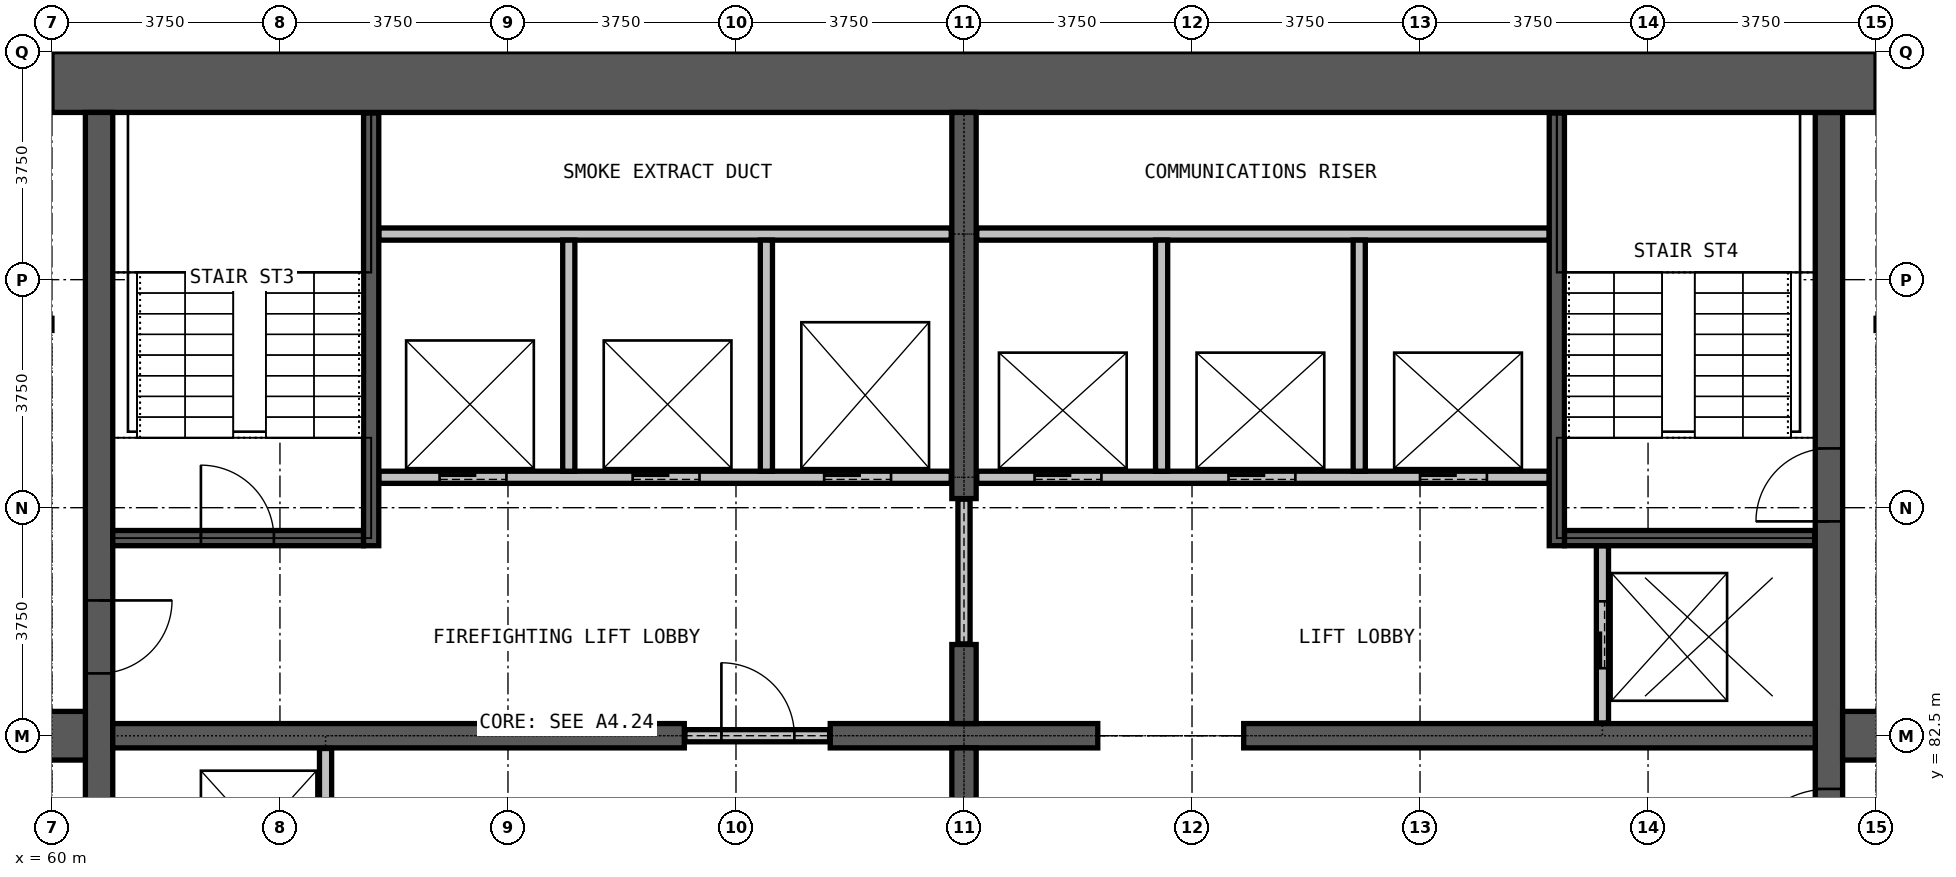
"""IFC4 building model, lengths in metres.
Left out: names, types, materials, properties, quantities, classifications, styles, units other than length and angle.
Written with IfcOpenShell. Run it as: python <this file> out.ifc"""

import sys

from ifc_helpers import new_model, si_unit, direction, frame, frame_2d, origin, place, context, subcontext, project, spatial, rectangle, extrude, element, fill, save


model = new_model("IFC4")
c1 = context("Model", 3, precision=1e-05, world=origin(), true_north=direction((0.0, 1.0)))
c2 = subcontext(c1, "Body", "Model", "MODEL_VIEW")
j1 = project(units=[si_unit("LENGTHUNIT", "METRE"), si_unit("PLANEANGLEUNIT", "RADIAN")], contexts=[c1])
p1 = place(None, origin())
s1 = spatial("IfcSite", under=j1, at=p1, CompositionType="ELEMENT")
p2 = place(p1, origin())
s2 = spatial("IfcBuilding", under=s1, at=p2, CompositionType="ELEMENT")
p3 = place(p2, frame((0.0, 0.0, 253.5)))
s3 = spatial("IfcBuildingStorey", under=s2, at=p3, CompositionType="ELEMENT", Elevation=253.5)
p4 = place(p3, frame((89.225, 72.25, 0.0), z_axis=(0.0, 0.0, 1.0), x_axis=(0.0, 1.0, 0.0)))
e1 = element("IfcWall", 1, at=p4, inside=s3, PredefinedType="SHEAR", context=c2, shape_type="SweptSolid", body=[
    extrude(rectangle(XDim=20.5, YDim=0.45, at=frame_2d((10.25, 0.0))), origin(), (0.0, 0.0, 1.0), 5.0),
])
p5 = place(p4, frame((0.275, 0.0, 0.0)))
e2 = element("IfcOpeningElement", 2, at=p5, cuts=e1, PredefinedType="OPENING", context=c2, shape_type="SweptSolid", body=[
    extrude(rectangle(XDim=1.2, YDim=2.2, at=frame_2d((0.6, 1.1))), frame((0.0, 0.235, 0.0), z_axis=(0.0, -1.0, 0.0), x_axis=(1.0, 0.0, 0.0)), (0.0, 0.0, 1.0), 0.47),
])
p6 = place(p4, frame((13.775, 0.0, 0.0)))
e3 = element("IfcOpeningElement", 3, at=p6, cuts=e1, PredefinedType="OPENING", context=c2, shape_type="SweptSolid", body=[
    extrude(rectangle(XDim=1.2, YDim=2.2, at=frame_2d((0.6, 1.1))), frame((0.0, 0.235, 0.0), z_axis=(0.0, -1.0, 0.0), x_axis=(1.0, 0.0, 0.0)), (0.0, 0.0, 1.0), 0.47),
])
p7 = place(p4, frame((7.875, 0.0, 0.0)))
e4 = element("IfcOpeningElement", 4, at=p7, cuts=e1, PredefinedType="OPENING", context=c2, shape_type="SweptSolid", body=[
    extrude(rectangle(XDim=1.5, YDim=2.2, at=frame_2d((0.75, 1.1))), frame((0.0, 0.235, 0.0), z_axis=(0.0, -1.0, 0.0), x_axis=(1.0, 0.0, 0.0)), (0.0, 0.0, 1.0), 0.47),
])
p8 = place(p3, frame((90.0, 93.25, 0.0), z_axis=(0.0, 0.0, 1.0), x_axis=(-1.0, 0.0, 0.0)))
e5 = element("IfcWall", 5, at=p8, inside=s3, PredefinedType="SHEAR", context=c2, shape_type="SweptSolid", body=[
    extrude(rectangle(XDim=30.0, YDim=1.0, at=frame_2d((15.0, 0.0))), origin(), (0.0, 0.0, 1.0), 5.0),
])
p9 = place(p3, frame((60.775, 92.75, 0.0), z_axis=(0.0, 0.0, 1.0), x_axis=(0.0, -1.0, 0.0)))
e6 = element("IfcWall", 6, at=p9, inside=s3, PredefinedType="SHEAR", context=c2, shape_type="SweptSolid", body=[
    extrude(rectangle(XDim=20.5, YDim=0.45, at=frame_2d((10.25, 0.0))), origin(), (0.0, 0.0, 1.0), 5.0),
])
p10 = place(p9, frame((19.025, 0.0, 0.0)))
e7 = element("IfcOpeningElement", 7, at=p10, cuts=e6, PredefinedType="OPENING", context=c2, shape_type="SweptSolid", body=[
    extrude(rectangle(XDim=1.2, YDim=2.2, at=frame_2d((0.6, 1.1))), frame((0.0, 0.235, 0.0), z_axis=(0.0, -1.0, 0.0), x_axis=(1.0, 0.0, 0.0)), (0.0, 0.0, 1.0), 0.47),
])
p11 = place(p9, frame((8.025, 0.0, 0.0)))
e8 = element("IfcOpeningElement", 8, at=p11, cuts=e6, PredefinedType="OPENING", context=c2, shape_type="SweptSolid", body=[
    extrude(rectangle(XDim=1.2, YDim=2.2, at=frame_2d((0.6, 1.1))), frame((0.0, 0.235, 0.0), z_axis=(0.0, -1.0, 0.0), x_axis=(1.0, 0.0, 0.0)), (0.0, 0.0, 1.0), 0.47),
])
p12 = place(p3, frame((61.0, 82.5, 0.0), z_axis=(0.0, 0.0, 1.0), x_axis=(1.0, 0.0, 0.0)))
e9 = element("IfcWall", 9, at=p12, inside=s3, PredefinedType="SHEAR", context=c2, shape_type="SweptSolid", body=[
    extrude(rectangle(XDim=9.4, YDim=0.4, at=frame_2d((4.7, 0.0))), origin(), (0.0, 0.0, 1.0), 5.0),
])
p13 = place(p3, frame((72.8, 82.5, 0.0), z_axis=(0.0, 0.0, 1.0), x_axis=(1.0, 0.0, 0.0)))
e10 = element("IfcWall", 10, at=p13, inside=s3, PredefinedType="SHEAR", context=c2, shape_type="SweptSolid", body=[
    extrude(rectangle(XDim=4.4, YDim=0.4, at=frame_2d((2.2, 0.0))), origin(), (0.0, 0.0, 1.0), 5.0),
])
p14 = place(p3, frame((79.6, 82.5, 0.0), z_axis=(0.0, 0.0, 1.0), x_axis=(1.0, 0.0, 0.0)))
e11 = element("IfcWall", 11, at=p14, inside=s3, PredefinedType="SHEAR", context=c2, shape_type="SweptSolid", body=[
    extrude(rectangle(XDim=9.4, YDim=0.4, at=frame_2d((4.7, 0.0))), origin(), (0.0, 0.0, 1.0), 5.0),
])
for number, where, z_axis, x_axis in (
    (12, (75.0, 81.0, 0.0), (0.0, 0.0, 1.0), (0.0, 1.0, 0.0)),
    (13, (75.0, 82.7, 0.0), (0.0, 0.0, 1.0), (0.0, 1.0, 0.0)),
):
    element("IfcWall", number, at=place(p3, frame(where, z_axis=z_axis, x_axis=x_axis)), inside=s3, PredefinedType="SHEAR", context=c2, shape_type="SweptSolid", body=[
        extrude(rectangle(XDim=1.3, YDim=0.4, at=frame_2d((0.65, 0.0))), origin(), (0.0, 0.0, 1.0), 5.0),
    ])
p15 = place(p3, frame((75.0, 86.4, 0.0), z_axis=(0.0, 0.0, 1.0), x_axis=(0.0, 1.0, 0.0)))
e14 = element("IfcWall", 14, at=p15, inside=s3, PredefinedType="SHEAR", context=c2, shape_type="SweptSolid", body=[
    extrude(rectangle(XDim=6.35, YDim=0.4, at=frame_2d((3.175, 0.0))), origin(), (0.0, 0.0, 1.0), 5.0),
])
for number, where, z_axis, x_axis in (
    (15, (89.45, 82.5, 0.0), (0.0, 0.0, 1.0), (1.0, 0.0, 0.0)),
    (16, (57.95, 82.5, 0.0), (0.0, 0.0, 1.0), (1.0, 0.0, 0.0)),
):
    element("IfcWall", number, at=place(p3, frame(where, z_axis=z_axis, x_axis=x_axis)), inside=s3, PredefinedType="SHEAR", context=c2, shape_type="SweptSolid", body=[
        extrude(rectangle(XDim=2.6, YDim=0.8, at=frame_2d((1.3, 0.0))), origin(), (0.0, 0.0, 1.0), 4.7),
    ])
p16 = place(p3, frame((70.41, 82.5, 0.0), z_axis=(0.0, 0.0, 1.0), x_axis=(1.0, 0.0, 0.0)))
e17 = element("IfcWall", 17, at=p16, inside=s3, PredefinedType="PARTITIONING", context=c2, shape_type="SweptSolid", body=[
    extrude(rectangle(XDim=2.38, YDim=0.2, at=frame_2d((1.19, 0.0))), origin(), (0.0, 0.0, 1.0), 2.4),
])
p17 = place(p16, frame((0.6, 0.0, 0.0)))
e18 = element("IfcOpeningElement", 18, at=p17, cuts=e17, PredefinedType="OPENING", context=c2, shape_type="SweptSolid", body=[
    extrude(rectangle(XDim=1.2, YDim=2.2, at=frame_2d((0.6, 1.1))), frame((0.0, 0.11, 0.0), z_axis=(0.0, -1.0, 0.0), x_axis=(1.0, 0.0, 0.0)), (0.0, 0.0, 1.0), 0.22),
])
p18 = place(p3, frame((75.0, 84.01, 0.0), z_axis=(0.0, 0.0, 1.0), x_axis=(0.0, 1.0, 0.0)))
e19 = element("IfcWall", 19, at=p18, inside=s3, PredefinedType="PARTITIONING", context=c2, shape_type="SweptSolid", body=[
    extrude(rectangle(XDim=2.38, YDim=0.2, at=frame_2d((1.19, 0.0))), origin(), (0.0, 0.0, 1.0), 2.4),
])
p19 = place(p3, frame((65.375, 86.75, 0.0), z_axis=(0.0, 0.0, 1.0), x_axis=(1.0, 0.0, 0.0)))
e20 = element("IfcWall", 20, at=p19, inside=s3, PredefinedType="PARTITIONING", context=c2, shape_type="SweptSolid", body=[
    extrude(rectangle(XDim=9.415, YDim=0.2, at=frame_2d((4.708, 0.0))), origin(), (0.0, 0.0, 1.0), 4.7),
])
p20 = place(p19, frame((1.0, 0.0, 0.0)))
e21 = element("IfcOpeningElement", 21, at=p20, cuts=e20, PredefinedType="OPENING", context=c2, shape_type="SweptSolid", body=[
    extrude(rectangle(XDim=1.1, YDim=2.2, at=frame_2d((0.55, 1.1))), frame((0.0, 0.11, 0.0), z_axis=(0.0, -1.0, 0.0), x_axis=(1.0, 0.0, 0.0)), (0.0, 0.0, 1.0), 0.22),
])
p21 = place(p19, frame((4.175, 0.0, 0.0)))
e22 = element("IfcOpeningElement", 22, at=p21, cuts=e20, PredefinedType="OPENING", context=c2, shape_type="SweptSolid", body=[
    extrude(rectangle(XDim=1.1, YDim=2.2, at=frame_2d((0.55, 1.1))), frame((0.0, 0.11, 0.0), z_axis=(0.0, -1.0, 0.0), x_axis=(1.0, 0.0, 0.0)), (0.0, 0.0, 1.0), 0.22),
])
p22 = place(p19, frame((7.325, 0.0, 0.0)))
e23 = element("IfcOpeningElement", 23, at=p22, cuts=e20, PredefinedType="OPENING", context=c2, shape_type="SweptSolid", body=[
    extrude(rectangle(XDim=1.1, YDim=2.2, at=frame_2d((0.55, 1.1))), frame((0.0, 0.11, 0.0), z_axis=(0.0, -1.0, 0.0), x_axis=(1.0, 0.0, 0.0)), (0.0, 0.0, 1.0), 0.22),
])
p23 = place(p3, frame((75.21, 86.75, 0.0), z_axis=(0.0, 0.0, 1.0), x_axis=(1.0, 0.0, 0.0)))
e24 = element("IfcWall", 24, at=p23, inside=s3, PredefinedType="PARTITIONING", context=c2, shape_type="SweptSolid", body=[
    extrude(rectangle(XDim=9.415, YDim=0.2, at=frame_2d((4.708, 0.0))), origin(), (0.0, 0.0, 1.0), 4.7),
])
p24 = place(p23, frame((0.95, 0.0, 0.0)))
e25 = element("IfcOpeningElement", 25, at=p24, cuts=e24, PredefinedType="OPENING", context=c2, shape_type="SweptSolid", body=[
    extrude(rectangle(XDim=1.1, YDim=2.2, at=frame_2d((0.55, 1.1))), frame((0.0, 0.11, 0.0), z_axis=(0.0, -1.0, 0.0), x_axis=(1.0, 0.0, 0.0)), (0.0, 0.0, 1.0), 0.22),
])
p25 = place(p23, frame((4.14, 0.0, 0.0)))
e26 = element("IfcOpeningElement", 26, at=p25, cuts=e24, PredefinedType="OPENING", context=c2, shape_type="SweptSolid", body=[
    extrude(rectangle(XDim=1.1, YDim=2.2, at=frame_2d((0.55, 1.1))), frame((0.0, 0.11, 0.0), z_axis=(0.0, -1.0, 0.0), x_axis=(1.0, 0.0, 0.0)), (0.0, 0.0, 1.0), 0.22),
])
p26 = place(p23, frame((7.29, 0.0, 0.0)))
e27 = element("IfcOpeningElement", 27, at=p26, cuts=e24, PredefinedType="OPENING", context=c2, shape_type="SweptSolid", body=[
    extrude(rectangle(XDim=1.1, YDim=2.2, at=frame_2d((0.55, 1.1))), frame((0.0, 0.11, 0.0), z_axis=(0.0, -1.0, 0.0), x_axis=(1.0, 0.0, 0.0)), (0.0, 0.0, 1.0), 0.22),
])
for number, where, z_axis, x_axis in (
    (28, (65.375, 90.75, 0.0), (0.0, 0.0, 1.0), (1.0, 0.0, 0.0)),
    (29, (75.21, 90.75, 0.0), (0.0, 0.0, 1.0), (1.0, 0.0, 0.0)),
):
    element("IfcWall", number, at=place(p3, frame(where, z_axis=z_axis, x_axis=x_axis)), inside=s3, PredefinedType="PARTITIONING", context=c2, shape_type="SweptSolid", body=[
        extrude(rectangle(XDim=9.415, YDim=0.2, at=frame_2d((4.708, 0.0))), origin(), (0.0, 0.0, 1.0), 4.7),
    ])
p27 = place(p3, frame((64.5, 79.375, 0.0), z_axis=(0.0, 0.0, 1.0), x_axis=(0.0, 1.0, 0.0)))
e30 = element("IfcWall", 30, at=p27, inside=s3, PredefinedType="PARTITIONING", context=c2, shape_type="SweptSolid", body=[
    extrude(rectangle(XDim=2.915, YDim=0.2, at=frame_2d((1.458, 0.0))), origin(), (0.0, 0.0, 1.0), 4.7),
])
for number, where, z_axis, x_axis in (
    (31, (68.5, 86.85, 0.0), (0.0, 0.0, 1.0), (0.0, 1.0, 0.0)),
    (32, (71.75, 86.85, 0.0), (0.0, 0.0, 1.0), (0.0, 1.0, 0.0)),
    (33, (78.25, 86.85, 0.0), (0.0, 0.0, 1.0), (0.0, 1.0, 0.0)),
    (34, (81.5, 86.85, 0.0), (0.0, 0.0, 1.0), (0.0, 1.0, 0.0)),
):
    element("IfcWall", number, at=place(p3, frame(where, z_axis=z_axis, x_axis=x_axis)), inside=s3, PredefinedType="PARTITIONING", context=c2, shape_type="SweptSolid", body=[
        extrude(rectangle(XDim=3.8, YDim=0.2, at=frame_2d((1.9, 0.0))), origin(), (0.0, 0.0, 1.0), 4.7),
    ])
p28 = place(p3, frame((85.5, 82.71, 0.0), z_axis=(0.0, 0.0, 1.0), x_axis=(0.0, 1.0, 0.0)))
e35 = element("IfcWall", 35, at=p28, inside=s3, PredefinedType="PARTITIONING", context=c2, shape_type="SweptSolid", body=[
    extrude(rectangle(XDim=2.915, YDim=0.2, at=frame_2d((1.458, 0.0))), origin(), (0.0, 0.0, 1.0), 4.7),
])
p29 = place(p28, frame((0.9, 0.0, 0.0)))
e36 = element("IfcOpeningElement", 36, at=p29, cuts=e35, PredefinedType="OPENING", context=c2, shape_type="SweptSolid", body=[
    extrude(rectangle(XDim=1.1, YDim=2.2, at=frame_2d((0.55, 1.1))), frame((0.0, 0.11, 0.0), z_axis=(0.0, -1.0, 0.0), x_axis=(1.0, 0.0, 0.0)), (0.0, 0.0, 1.0), 0.22),
])
p30 = place(p3, frame((61.0, 85.75, 0.0), z_axis=(0.0, 0.0, 1.0), x_axis=(1.0, 0.0, 0.0)))
e37 = element("IfcWall", 37, at=p30, inside=s3, PredefinedType="PARTITIONING", context=c2, shape_type="SweptSolid", body=[
    extrude(rectangle(XDim=4.125, YDim=0.25, at=frame_2d((2.062, 0.0))), origin(), (0.0, 0.0, 1.0), 4.7),
])
p31 = place(p30, frame((1.45, 0.0, 0.0)))
e38 = element("IfcOpeningElement", 38, at=p31, cuts=e37, PredefinedType="OPENING", context=c2, shape_type="SweptSolid", body=[
    extrude(rectangle(XDim=1.2, YDim=2.2, at=frame_2d((0.6, 1.1))), frame((0.0, 0.135, 0.0), z_axis=(0.0, -1.0, 0.0), x_axis=(1.0, 0.0, 0.0)), (0.0, 0.0, 1.0), 0.27),
])
p32 = place(p3, frame((84.875, 85.75, 0.0), z_axis=(0.0, 0.0, 1.0), x_axis=(1.0, 0.0, 0.0)))
e39 = element("IfcWall", 39, at=p32, inside=s3, PredefinedType="PARTITIONING", context=c2, shape_type="SweptSolid", body=[
    extrude(rectangle(XDim=4.115, YDim=0.25, at=frame_2d((2.058, 0.0))), origin(), (0.0, 0.0, 1.0), 4.7),
])
for number, where, z_axis, x_axis in (
    (40, (65.25, 85.625, 0.0), (0.0, 0.0, 1.0), (0.0, 1.0, 0.0)),
    (41, (84.75, 85.625, 0.0), (0.0, 0.0, 1.0), (0.0, 1.0, 0.0)),
):
    element("IfcWall", number, at=place(p3, frame(where, z_axis=z_axis, x_axis=x_axis)), inside=s3, PredefinedType="PARTITIONING", context=c2, shape_type="SweptSolid", body=[
        extrude(rectangle(XDim=7.115, YDim=0.25, at=frame_2d((3.558, 0.0))), origin(), (0.0, 0.0, 1.0), 4.7),
    ])
p33 = place(p24, origin())
e42 = element("IfcDoor", 42, at=p33, inside=s3, OperationType="DOUBLE_DOOR_SLIDING", PredefinedType="DOOR", context=c2, shape_type="SweptSolid", body=[
    extrude(rectangle(XDim=1.1, YDim=2.2, at=frame_2d((0.55, 1.1))), frame((0.0, 0.025, 0.0), z_axis=(0.0, -1.0, 0.0), x_axis=(1.0, 0.0, 0.0)), (0.0, 0.0, 1.0), 0.05),
])
fill(e25, e42)
p34 = place(p25, origin())
e43 = element("IfcDoor", 43, at=p34, inside=s3, OperationType="DOUBLE_DOOR_SLIDING", PredefinedType="DOOR", context=c2, shape_type="SweptSolid", body=[
    extrude(rectangle(XDim=1.1, YDim=2.2, at=frame_2d((0.55, 1.1))), frame((0.0, 0.025, 0.0), z_axis=(0.0, -1.0, 0.0), x_axis=(1.0, 0.0, 0.0)), (0.0, 0.0, 1.0), 0.05),
])
fill(e26, e43)
p35 = place(p26, origin())
e44 = element("IfcDoor", 44, at=p35, inside=s3, OperationType="DOUBLE_DOOR_SLIDING", PredefinedType="DOOR", context=c2, shape_type="SweptSolid", body=[
    extrude(rectangle(XDim=1.1, YDim=2.2, at=frame_2d((0.55, 1.1))), frame((0.0, 0.025, 0.0), z_axis=(0.0, -1.0, 0.0), x_axis=(1.0, 0.0, 0.0)), (0.0, 0.0, 1.0), 0.05),
])
fill(e27, e44)
p36 = place(p20, origin())
e45 = element("IfcDoor", 45, at=p36, inside=s3, OperationType="DOUBLE_DOOR_SLIDING", PredefinedType="DOOR", context=c2, shape_type="SweptSolid", body=[
    extrude(rectangle(XDim=1.1, YDim=2.2, at=frame_2d((0.55, 1.1))), frame((0.0, 0.025, 0.0), z_axis=(0.0, -1.0, 0.0), x_axis=(1.0, 0.0, 0.0)), (0.0, 0.0, 1.0), 0.05),
])
fill(e21, e45)
p37 = place(p21, origin())
e46 = element("IfcDoor", 46, at=p37, inside=s3, OperationType="DOUBLE_DOOR_SLIDING", PredefinedType="DOOR", context=c2, shape_type="SweptSolid", body=[
    extrude(rectangle(XDim=1.1, YDim=2.2, at=frame_2d((0.55, 1.1))), frame((0.0, 0.025, 0.0), z_axis=(0.0, -1.0, 0.0), x_axis=(1.0, 0.0, 0.0)), (0.0, 0.0, 1.0), 0.05),
])
fill(e22, e46)
p38 = place(p22, origin())
e47 = element("IfcDoor", 47, at=p38, inside=s3, OperationType="DOUBLE_DOOR_SLIDING", PredefinedType="DOOR", context=c2, shape_type="SweptSolid", body=[
    extrude(rectangle(XDim=1.1, YDim=2.2, at=frame_2d((0.55, 1.1))), frame((0.0, 0.025, 0.0), z_axis=(0.0, -1.0, 0.0), x_axis=(1.0, 0.0, 0.0)), (0.0, 0.0, 1.0), 0.05),
])
fill(e23, e47)
p39 = place(p29, origin())
e48 = element("IfcDoor", 48, at=p39, inside=s3, OperationType="DOUBLE_DOOR_SLIDING", PredefinedType="DOOR", context=c2, shape_type="SweptSolid", body=[
    extrude(rectangle(XDim=1.1, YDim=2.2, at=frame_2d((0.55, 1.1))), frame((0.0, 0.025, 0.0), z_axis=(0.0, -1.0, 0.0), x_axis=(1.0, 0.0, 0.0)), (0.0, 0.0, 1.0), 0.05),
])
fill(e36, e48)
p40 = place(p17, origin())
e49 = element("IfcDoor", 49, at=p40, inside=s3, OperationType="SINGLE_SWING_LEFT", PredefinedType="DOOR", context=c2, shape_type="SweptSolid", body=[
    extrude(rectangle(XDim=1.2, YDim=2.2, at=frame_2d((0.6, 1.1))), frame((0.0, 0.025, 0.0), z_axis=(0.0, -1.0, 0.0), x_axis=(1.0, 0.0, 0.0)), (0.0, 0.0, 1.0), 0.05),
])
fill(e18, e49)
p41 = place(p31, origin())
e50 = element("IfcDoor", 50, at=p41, inside=s3, OperationType="SINGLE_SWING_RIGHT", PredefinedType="DOOR", context=c2, shape_type="SweptSolid", body=[
    extrude(rectangle(XDim=1.2, YDim=2.2, at=frame_2d((0.6, 1.1))), frame((0.0, 0.025, 0.0), z_axis=(0.0, -1.0, 0.0), x_axis=(1.0, 0.0, 0.0)), (0.0, 0.0, 1.0), 0.05),
])
fill(e38, e50)
p42 = place(p6, origin())
e51 = element("IfcDoor", 51, at=p42, inside=s3, OperationType="SINGLE_SWING_LEFT", PredefinedType="DOOR", context=c2, shape_type="SweptSolid", body=[
    extrude(rectangle(XDim=1.2, YDim=2.2, at=frame_2d((0.6, 1.1))), frame((0.0, 0.025, 0.0), z_axis=(0.0, -1.0, 0.0), x_axis=(1.0, 0.0, 0.0)), (0.0, 0.0, 1.0), 0.05),
])
fill(e3, e51)
p43 = place(p7, origin())
e52 = element("IfcDoor", 52, at=p43, inside=s3, OperationType="DOUBLE_DOOR_SINGLE_SWING", PredefinedType="DOOR", context=c2, shape_type="SweptSolid", body=[
    extrude(rectangle(XDim=1.5, YDim=2.2, at=frame_2d((0.75, 1.1))), frame((0.0, 0.025, 0.0), z_axis=(0.0, -1.0, 0.0), x_axis=(1.0, 0.0, 0.0)), (0.0, 0.0, 1.0), 0.05),
])
fill(e4, e52)
p44 = place(p11, origin())
e53 = element("IfcDoor", 53, at=p44, inside=s3, OperationType="SINGLE_SWING_RIGHT", PredefinedType="DOOR", context=c2, shape_type="SweptSolid", body=[
    extrude(rectangle(XDim=1.2, YDim=2.2, at=frame_2d((0.6, 1.1))), frame((0.0, 0.025, 0.0), z_axis=(0.0, -1.0, 0.0), x_axis=(1.0, 0.0, 0.0)), (0.0, 0.0, 1.0), 0.05),
])
fill(e8, e53)
save(model, sys.argv[1])
